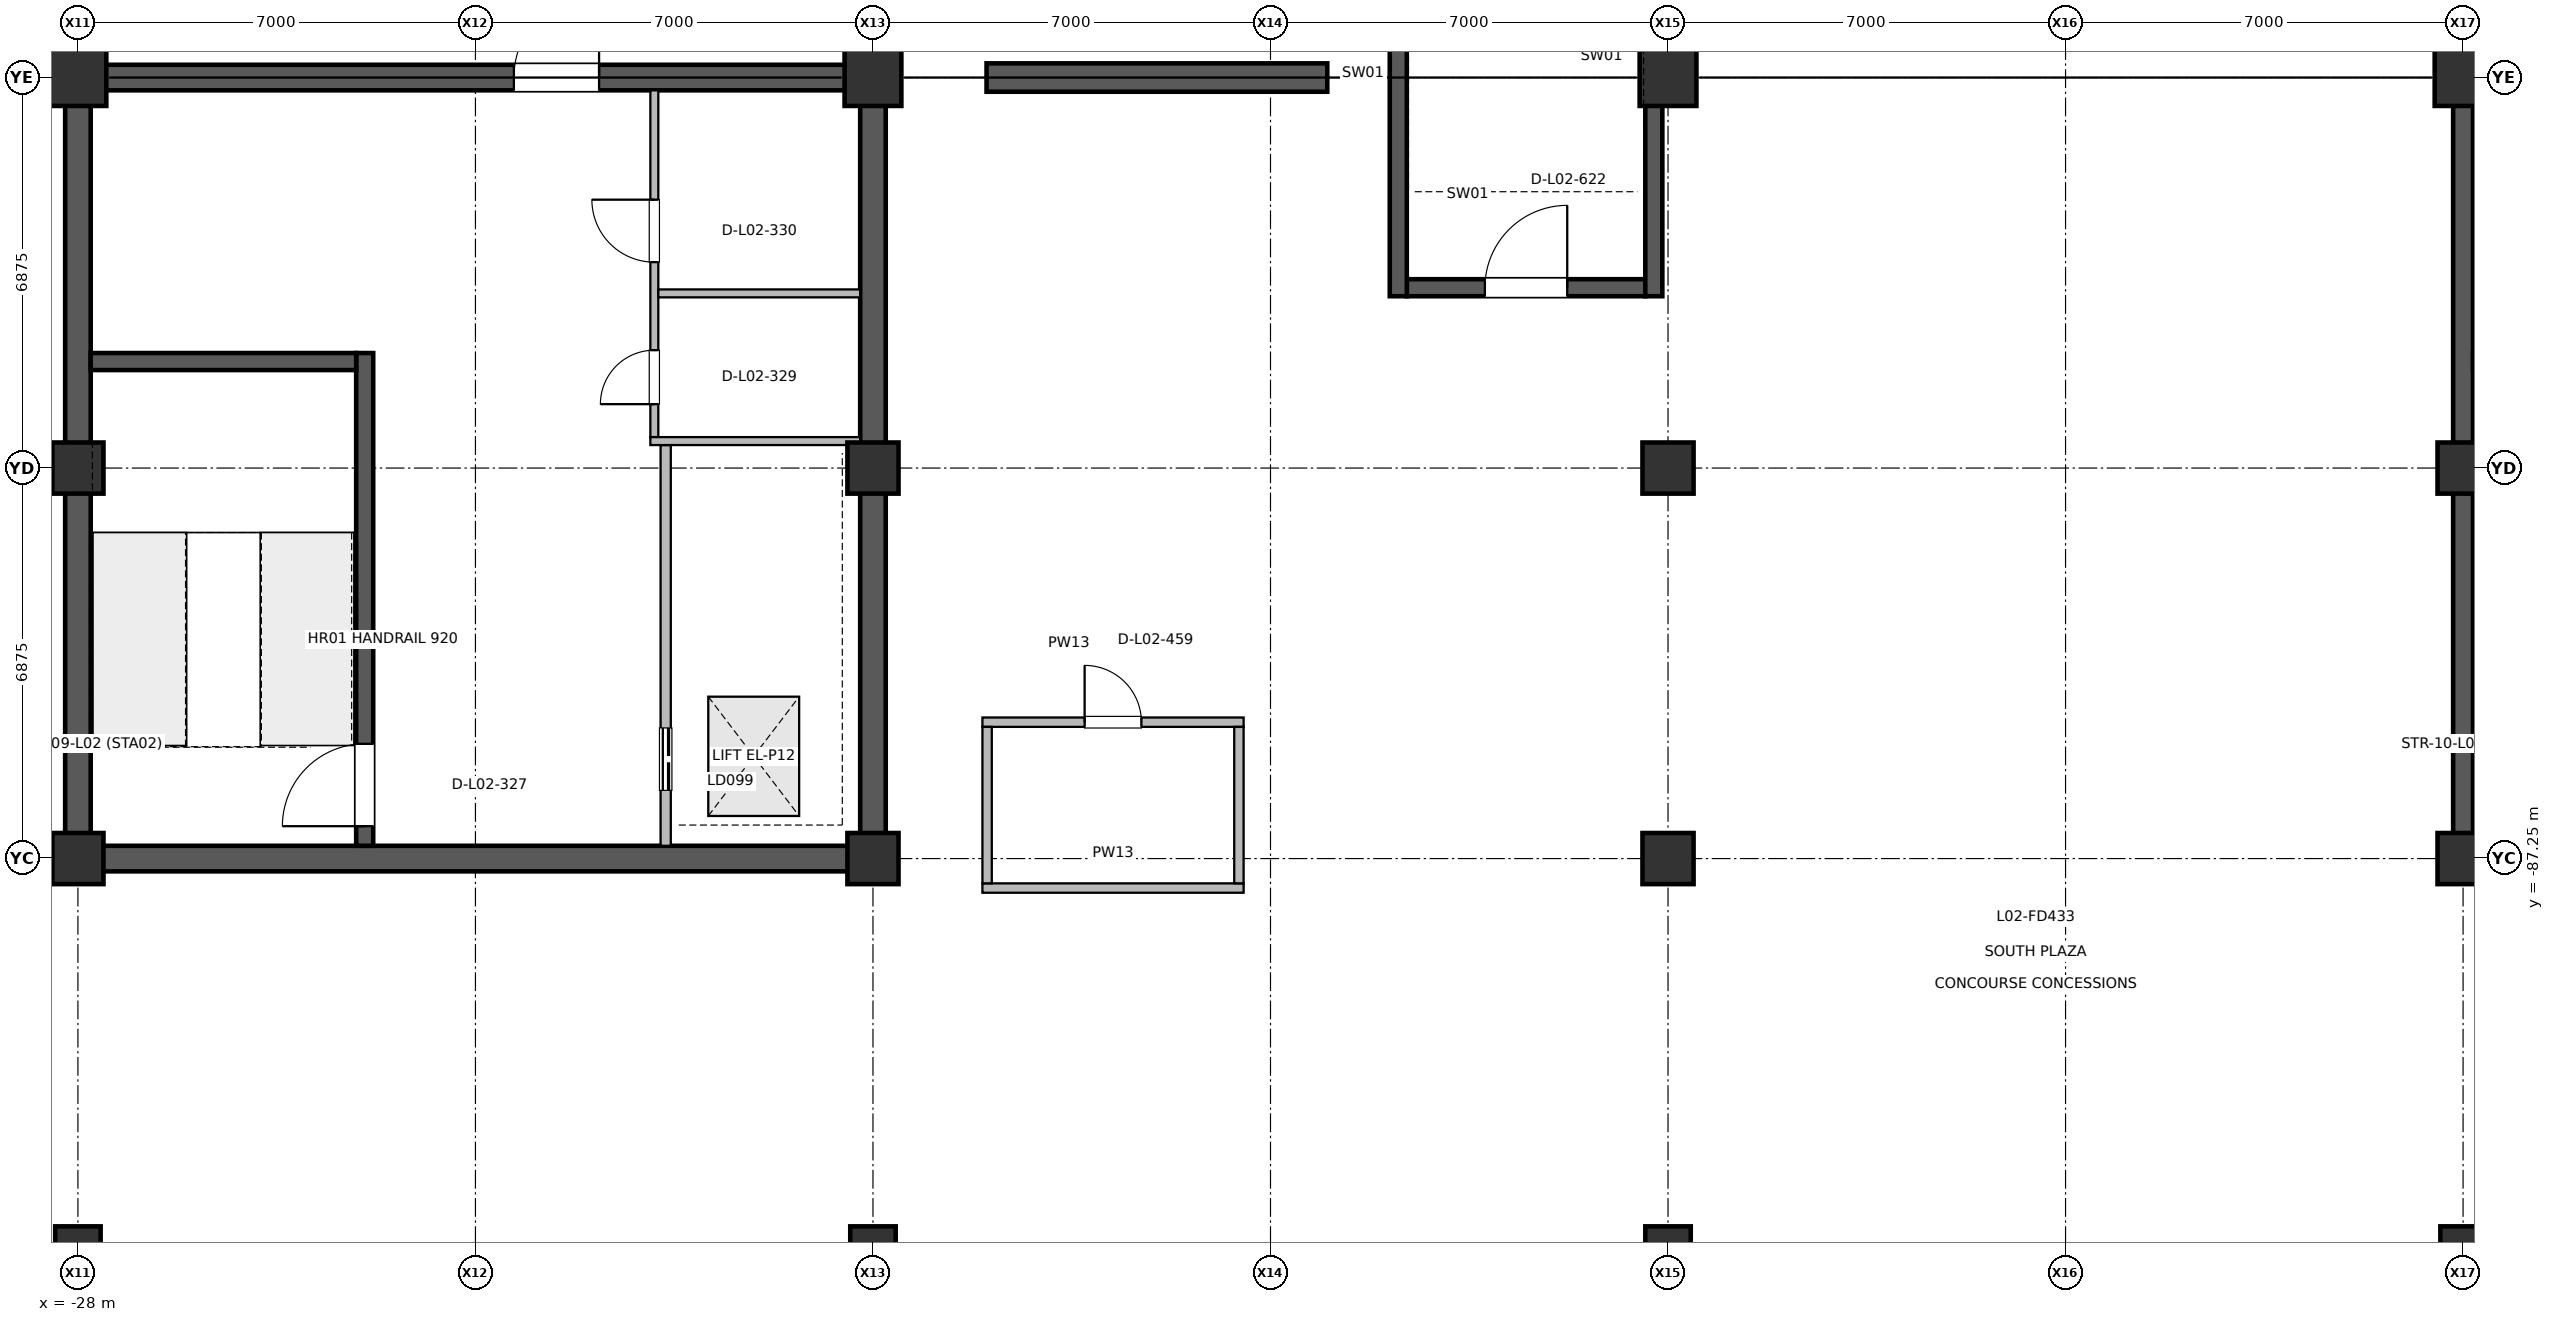
"""IFC4 building model, lengths in metres.
Left out: names, types, materials, properties, quantities, classifications, styles, units other than length and angle.
Written with IfcOpenShell. Run it as: python <this file> out.ifc"""

import sys

from ifc_helpers import new_model, si_unit, direction, frame, frame_2d, origin, origin_2d, place, context, subcontext, project, spatial, rectangle, circle, extrude, element, fill, save


model = new_model("IFC4")
c1 = context("Model", 3, precision=1e-05, world=origin(), true_north=direction((0.0, 1.0)))
c2 = subcontext(c1, "Body", "Model", "MODEL_VIEW")
j1 = project(units=[si_unit("LENGTHUNIT", "METRE"), si_unit("PLANEANGLEUNIT", "RADIAN")], contexts=[c1])
p1 = place(None, origin())
s1 = spatial("IfcSite", under=j1, at=p1, CompositionType="ELEMENT")
p2 = place(p1, origin())
s2 = spatial("IfcBuilding", under=s1, at=p2, CompositionType="ELEMENT")
p3 = place(p2, frame((0.0, 0.0, 6.0)))
s3 = spatial("IfcBuildingStorey", under=s2, at=p3, CompositionType="ELEMENT", Elevation=6.0)
p4 = place(p3, frame((-28.0, -94.125, 0.0), z_axis=(0.0, 0.0, 1.0), x_axis=(1.0, 0.0, 0.0)))
e1 = element("IfcColumn", 1, at=p4, inside=s3, PredefinedType="COLUMN", context=c2, shape_type="SweptSolid", body=[
    extrude(circle(Radius=0.4, at=origin_2d()), origin(), (0.0, 0.0, 1.0), 5.16),
])
for number, where, z_axis, x_axis in (
    (2, (-28.0, -87.25, 0.0), (0.0, 0.0, 1.0), (1.0, 0.0, 0.0)),
    (3, (-28.0, -80.375, 0.0), (0.0, 0.0, 1.0), (1.0, 0.0, 0.0)),
):
    element("IfcColumn", number, at=place(p3, frame(where, z_axis=z_axis, x_axis=x_axis)), inside=s3, PredefinedType="COLUMN", context=c2, shape_type="SweptSolid", body=[
        extrude(rectangle(XDim=0.9, YDim=0.9, at=origin_2d()), origin(), (0.0, 0.0, 1.0), 5.398),
    ])
p5 = place(p3, frame((-28.0, -73.5, 0.0), z_axis=(0.0, 0.0, 1.0), x_axis=(1.0, 0.0, 0.0)))
e4 = element("IfcColumn", 4, at=p5, inside=s3, PredefinedType="COLUMN", context=c2, shape_type="SweptSolid", body=[
    extrude(rectangle(XDim=1.0, YDim=1.0, at=origin_2d()), origin(), (0.0, 0.0, 1.0), 5.398),
])
p6 = place(p3, frame((-14.0, -94.125, 0.0), z_axis=(0.0, 0.0, 1.0), x_axis=(1.0, 0.0, 0.0)))
e5 = element("IfcColumn", 5, at=p6, inside=s3, PredefinedType="COLUMN", context=c2, shape_type="SweptSolid", body=[
    extrude(circle(Radius=0.4, at=origin_2d()), origin(), (0.0, 0.0, 1.0), 5.16),
])
for number, where, z_axis, x_axis in (
    (6, (-14.0, -87.25, 0.0), (0.0, 0.0, 1.0), (1.0, 0.0, 0.0)),
    (7, (-14.0, -80.375, 0.0), (0.0, 0.0, 1.0), (1.0, 0.0, 0.0)),
):
    element("IfcColumn", number, at=place(p3, frame(where, z_axis=z_axis, x_axis=x_axis)), inside=s3, PredefinedType="COLUMN", context=c2, shape_type="SweptSolid", body=[
        extrude(rectangle(XDim=0.9, YDim=0.9, at=origin_2d()), origin(), (0.0, 0.0, 1.0), 5.398),
    ])
p7 = place(p3, frame((-14.0, -73.5, 0.0), z_axis=(0.0, 0.0, 1.0), x_axis=(1.0, 0.0, 0.0)))
e8 = element("IfcColumn", 8, at=p7, inside=s3, PredefinedType="COLUMN", context=c2, shape_type="SweptSolid", body=[
    extrude(rectangle(XDim=1.0, YDim=1.0, at=origin_2d()), origin(), (0.0, 0.0, 1.0), 5.398),
])
p8 = place(p3, frame((0.0, -94.125, 0.0), z_axis=(0.0, 0.0, 1.0), x_axis=(1.0, 0.0, 0.0)))
e9 = element("IfcColumn", 9, at=p8, inside=s3, PredefinedType="COLUMN", context=c2, shape_type="SweptSolid", body=[
    extrude(circle(Radius=0.4, at=origin_2d()), origin(), (0.0, 0.0, 1.0), 5.16),
])
for number, where, z_axis, x_axis in (
    (10, (0.0, -87.25, 0.0), (0.0, 0.0, 1.0), (1.0, 0.0, 0.0)),
    (11, (0.0, -80.375, 0.0), (0.0, 0.0, 1.0), (1.0, 0.0, 0.0)),
):
    element("IfcColumn", number, at=place(p3, frame(where, z_axis=z_axis, x_axis=x_axis)), inside=s3, PredefinedType="COLUMN", context=c2, shape_type="SweptSolid", body=[
        extrude(rectangle(XDim=0.9, YDim=0.9, at=origin_2d()), origin(), (0.0, 0.0, 1.0), 5.398),
    ])
p9 = place(p3, frame((0.0, -73.5, 0.0), z_axis=(0.0, 0.0, 1.0), x_axis=(1.0, 0.0, 0.0)))
e12 = element("IfcColumn", 12, at=p9, inside=s3, PredefinedType="COLUMN", context=c2, shape_type="SweptSolid", body=[
    extrude(rectangle(XDim=1.0, YDim=1.0, at=origin_2d()), origin(), (0.0, 0.0, 1.0), 5.398),
])
p10 = place(p3, frame((14.0, -94.125, 0.0), z_axis=(0.0, 0.0, 1.0), x_axis=(1.0, 0.0, 0.0)))
e13 = element("IfcColumn", 13, at=p10, inside=s3, PredefinedType="COLUMN", context=c2, shape_type="SweptSolid", body=[
    extrude(circle(Radius=0.4, at=origin_2d()), origin(), (0.0, 0.0, 1.0), 5.16),
])
for number, where, z_axis, x_axis in (
    (14, (14.0, -87.25, 0.0), (0.0, 0.0, 1.0), (1.0, 0.0, 0.0)),
    (15, (14.0, -80.375, 0.0), (0.0, 0.0, 1.0), (1.0, 0.0, 0.0)),
):
    element("IfcColumn", number, at=place(p3, frame(where, z_axis=z_axis, x_axis=x_axis)), inside=s3, PredefinedType="COLUMN", context=c2, shape_type="SweptSolid", body=[
        extrude(rectangle(XDim=0.9, YDim=0.9, at=origin_2d()), origin(), (0.0, 0.0, 1.0), 5.398),
    ])
p11 = place(p3, frame((14.0, -73.5, 0.0), z_axis=(0.0, 0.0, 1.0), x_axis=(1.0, 0.0, 0.0)))
e16 = element("IfcColumn", 16, at=p11, inside=s3, PredefinedType="COLUMN", context=c2, shape_type="SweptSolid", body=[
    extrude(rectangle(XDim=1.0, YDim=1.0, at=origin_2d()), origin(), (0.0, 0.0, 1.0), 5.398),
])
for number, where, z_axis, x_axis in (
    (17, (-28.0, -87.025, 0.0), (0.0, 0.0, 1.0), (0.0, 1.0, 0.0)),
    (18, (-14.0, -87.025, 0.0), (0.0, 0.0, 1.0), (0.0, 1.0, 0.0)),
):
    element("IfcWall", number, at=place(p3, frame(where, z_axis=z_axis, x_axis=x_axis)), inside=s3, PredefinedType="SHEAR", context=c2, shape_type="SweptSolid", body=[
        extrude(rectangle(XDim=13.3, YDim=0.45, at=frame_2d((6.65, 0.0))), origin(), (0.0, 0.0, 1.0), 5.2),
    ])
p12 = place(p3, frame((-27.775, -87.25, 0.0), z_axis=(0.0, 0.0, 1.0), x_axis=(1.0, 0.0, 0.0)))
e19 = element("IfcWall", 19, at=p12, inside=s3, PredefinedType="SHEAR", context=c2, shape_type="SweptSolid", body=[
    extrude(rectangle(XDim=13.55, YDim=0.45, at=frame_2d((6.775, 0.0))), origin(), (0.0, 0.0, 1.0), 5.2),
])
p13 = place(p3, frame((-27.775, -73.5, 0.0), z_axis=(0.0, 0.0, 1.0), x_axis=(1.0, 0.0, 0.0)))
e20 = element("IfcWall", 20, at=p13, inside=s3, PredefinedType="SHEAR", context=c2, shape_type="SweptSolid", body=[
    extrude(rectangle(XDim=13.55, YDim=0.45, at=frame_2d((6.775, 0.0))), origin(), (0.0, 0.0, 1.0), 5.2),
])
p14 = place(p13, frame((7.452, 0.0, 0.0)))
e21 = element("IfcOpeningElement", 21, at=p14, cuts=e20, PredefinedType="OPENING", context=c2, shape_type="SweptSolid", body=[
    extrude(rectangle(XDim=1.5, YDim=2.2, at=frame_2d((0.75, 1.1))), frame((0.0, 0.235, 0.0), z_axis=(0.0, -1.0, 0.0), x_axis=(1.0, 0.0, 0.0)), (0.0, 0.0, 1.0), 0.47),
])
p15 = place(p3, frame((14.0, -87.075, 0.0), z_axis=(0.0, 0.0, 1.0), x_axis=(0.0, 1.0, 0.0)))
e22 = element("IfcWall", 22, at=p15, inside=s3, PredefinedType="SHEAR", context=c2, shape_type="SweptSolid", body=[
    extrude(rectangle(XDim=13.4, YDim=0.35, at=frame_2d((6.7, 0.0))), origin(), (0.0, 0.0, 1.0), 5.2),
])
p16 = place(p3, frame((14.175, -87.25, 0.0), z_axis=(0.0, 0.0, 1.0), x_axis=(1.0, 0.0, 0.0)))
e23 = element("IfcWall", 23, at=p16, inside=s3, PredefinedType="SHEAR", context=c2, shape_type="SweptSolid", body=[
    extrude(rectangle(XDim=13.65, YDim=0.35, at=frame_2d((6.825, 0.0))), origin(), (0.0, 0.0, 1.0), 5.2),
])
p17 = place(p3, frame((14.175, -73.5, 0.0), z_axis=(0.0, 0.0, 1.0), x_axis=(1.0, 0.0, 0.0)))
e24 = element("IfcWall", 24, at=p17, inside=s3, PredefinedType="SHEAR", context=c2, shape_type="SweptSolid", body=[
    extrude(rectangle(XDim=13.65, YDim=0.35, at=frame_2d((6.825, 0.0))), origin(), (0.0, 0.0, 1.0), 5.2),
])
p18 = place(p17, frame((7.507, 0.0, 0.0)))
e25 = element("IfcOpeningElement", 25, at=p18, cuts=e24, PredefinedType="OPENING", context=c2, shape_type="SweptSolid", body=[
    extrude(rectangle(XDim=1.5, YDim=2.2, at=frame_2d((0.75, 1.1))), frame((0.0, 0.185, 0.0), z_axis=(0.0, -1.0, 0.0), x_axis=(1.0, 0.0, 0.0)), (0.0, 0.0, 1.0), 0.37),
])
p19 = place(p3, frame((-12.0, -73.5, 0.0), z_axis=(0.0, 0.0, 1.0), x_axis=(1.0, 0.0, 0.0)))
e26 = element("IfcWall", 26, at=p19, inside=s3, PredefinedType="SHEAR", context=c2, shape_type="SweptSolid", body=[
    extrude(rectangle(XDim=6.0, YDim=0.5, at=frame_2d((3.0, 0.0))), origin(), (0.0, 0.0, 1.0), 5.2),
])
p20 = place(p3, frame((-22.95, -87.025, 0.0), z_axis=(0.0, 0.0, 1.0), x_axis=(0.0, 1.0, 0.0)))
e27 = element("IfcWall", 27, at=p20, inside=s3, PredefinedType="SHEAR", context=c2, shape_type="SweptSolid", body=[
    extrude(rectangle(XDim=8.675, YDim=0.3, at=frame_2d((4.337, 0.0))), origin(), (0.0, 0.0, 1.0), 5.2),
])
p21 = place(p20, frame((0.345, 0.0, 0.0)))
e28 = element("IfcOpeningElement", 28, at=p21, cuts=e27, PredefinedType="OPENING", context=c2, shape_type="SweptSolid", body=[
    extrude(rectangle(XDim=1.45, YDim=2.2, at=frame_2d((0.725, 1.1))), frame((0.0, 0.16, 0.0), z_axis=(0.0, -1.0, 0.0), x_axis=(1.0, 0.0, 0.0)), (0.0, 0.0, 1.0), 0.32),
])
p22 = place(p3, frame((-17.65, -87.025, 0.0), z_axis=(0.0, 0.0, 1.0), x_axis=(0.0, 1.0, 0.0)))
e29 = element("IfcWall", 29, at=p22, inside=s3, PredefinedType="PARTITIONING", context=c2, shape_type="SweptSolid", body=[
    extrude(rectangle(XDim=7.055, YDim=0.18, at=frame_2d((3.527, 0.0))), origin(), (0.0, 0.0, 1.0), 4.42),
])
p23 = place(p22, frame((0.975, 0.0, 0.0)))
e30 = element("IfcOpeningElement", 30, at=p23, cuts=e29, PredefinedType="OPENING", context=c2, shape_type="SweptSolid", body=[
    extrude(rectangle(XDim=1.1, YDim=2.2, at=frame_2d((0.55, 1.1))), frame((0.0, 0.1, 0.0), z_axis=(0.0, -1.0, 0.0), x_axis=(1.0, 0.0, 0.0)), (0.0, 0.0, 1.0), 0.2),
])
p24 = place(p3, frame((-17.85, -79.83, 0.0), z_axis=(0.0, 0.0, 1.0), x_axis=(0.0, 1.0, 0.0)))
e31 = element("IfcWall", 31, at=p24, inside=s3, PredefinedType="PARTITIONING", context=c2, shape_type="SweptSolid", body=[
    extrude(rectangle(XDim=6.105, YDim=0.14, at=frame_2d((3.052, 0.0))), origin(), (0.0, 0.0, 1.0), 4.42),
])
p25 = place(p24, frame((0.58, 0.0, 0.0)))
e32 = element("IfcOpeningElement", 32, at=p25, cuts=e31, PredefinedType="OPENING", context=c2, shape_type="SweptSolid", body=[
    extrude(rectangle(XDim=0.95, YDim=2.15, at=frame_2d((0.475, 1.075))), frame((0.0, 0.08, 0.0), z_axis=(0.0, -1.0, 0.0), x_axis=(1.0, 0.0, 0.0)), (0.0, 0.0, 1.0), 0.16),
])
p26 = place(p24, frame((3.08, 0.0, 0.0)))
e33 = element("IfcOpeningElement", 33, at=p26, cuts=e31, PredefinedType="OPENING", context=c2, shape_type="SweptSolid", body=[
    extrude(rectangle(XDim=1.1, YDim=2.15, at=frame_2d((0.55, 1.075))), frame((0.0, 0.08, 0.0), z_axis=(0.0, -1.0, 0.0), x_axis=(1.0, 0.0, 0.0)), (0.0, 0.0, 1.0), 0.16),
])
p27 = place(p3, frame((-12.073, -84.849, 0.0), z_axis=(0.0, 0.0, 1.0), x_axis=(1.0, 0.0, 0.0)))
e34 = element("IfcWall", 34, at=p27, inside=s3, PredefinedType="PARTITIONING", context=c2, shape_type="SweptSolid", body=[
    extrude(rectangle(XDim=4.6, YDim=0.165, at=frame_2d((2.3, 0.0))), origin(), (0.0, 0.0, 1.0), 4.42),
])
p28 = place(p27, frame((1.8, 0.0, 0.0)))
e35 = element("IfcOpeningElement", 35, at=p28, cuts=e34, PredefinedType="OPENING", context=c2, shape_type="SweptSolid", body=[
    extrude(rectangle(XDim=1.0, YDim=2.15, at=frame_2d((0.5, 1.075))), frame((0.0, 0.093, 0.0), z_axis=(0.0, -1.0, 0.0), x_axis=(1.0, 0.0, 0.0)), (0.0, 0.0, 1.0), 0.185),
])
p29 = place(p3, frame((-17.92, -79.9, 0.0), z_axis=(0.0, 0.0, 1.0), x_axis=(1.0, 0.0, 0.0)))
e36 = element("IfcWall", 36, at=p29, inside=s3, PredefinedType="PARTITIONING", context=c2, shape_type="SweptSolid", body=[
    extrude(rectangle(XDim=3.695, YDim=0.14, at=frame_2d((1.847, 0.0))), origin(), (0.0, 0.0, 1.0), 4.42),
])
p30 = place(p3, frame((-17.78, -77.3, 0.0), z_axis=(0.0, 0.0, 1.0), x_axis=(1.0, 0.0, 0.0)))
e37 = element("IfcWall", 37, at=p30, inside=s3, PredefinedType="PARTITIONING", context=c2, shape_type="SweptSolid", body=[
    extrude(rectangle(XDim=3.555, YDim=0.14, at=frame_2d((1.777, 0.0))), origin(), (0.0, 0.0, 1.0), 4.42),
])
p31 = place(p3, frame((-12.073, -87.769, 0.0), z_axis=(0.0, 0.0, 1.0), x_axis=(1.0, 0.0, 0.0)))
e38 = element("IfcWall", 38, at=p31, inside=s3, PredefinedType="PARTITIONING", context=c2, shape_type="SweptSolid", body=[
    extrude(rectangle(XDim=4.6, YDim=0.165, at=frame_2d((2.3, 0.0))), origin(), (0.0, 0.0, 1.0), 4.075),
])
for number, where, z_axis, x_axis in (
    (39, (-11.99, -87.686, 0.0), (0.0, 0.0, 1.0), (0.0, 1.0, 0.0)),
    (40, (-7.556, -87.686, 0.0), (0.0, 0.0, 1.0), (0.0, 1.0, 0.0)),
):
    element("IfcWall", number, at=place(p3, frame(where, z_axis=z_axis, x_axis=x_axis)), inside=s3, PredefinedType="PARTITIONING", context=c2, shape_type="SweptSolid", body=[
        extrude(rectangle(XDim=2.754, YDim=0.165, at=frame_2d((1.377, 0.0))), origin(), (0.0, 0.0, 1.0), 4.075),
    ])
p32 = place(p3, frame((-27.775, -78.5, 0.0), z_axis=(0.0, 0.0, 1.0), x_axis=(1.0, 0.0, 0.0)))
e41 = element("IfcWall", 41, at=p32, inside=s3, PredefinedType="SHEAR", context=c2, shape_type="SweptSolid", body=[
    extrude(rectangle(XDim=4.675, YDim=0.3, at=frame_2d((2.337, 0.0))), origin(), (0.0, 0.0, 1.0), 5.2),
])
p33 = place(p3, frame((14.175, -78.5, 0.0), z_axis=(0.0, 0.0, 1.0), x_axis=(1.0, 0.0, 0.0)))
e42 = element("IfcWall", 42, at=p33, inside=s3, PredefinedType="SHEAR", context=c2, shape_type="SweptSolid", body=[
    extrude(rectangle(XDim=4.725, YDim=0.3, at=frame_2d((2.362, 0.0))), origin(), (0.0, 0.0, 1.0), 5.2),
])
p34 = place(p3, frame((-4.6, -77.2, 0.0), z_axis=(0.0, 0.0, 1.0), x_axis=(1.0, 0.0, 0.0)))
e43 = element("IfcWall", 43, at=p34, inside=s3, PredefinedType="SHEAR", context=c2, shape_type="SweptSolid", body=[
    extrude(rectangle(XDim=4.2, YDim=0.3, at=frame_2d((2.1, 0.0))), origin(), (0.0, 0.0, 1.0), 5.2),
])
p35 = place(p34, frame((1.375, 0.0, 0.0)))
e44 = element("IfcOpeningElement", 44, at=p35, cuts=e43, PredefinedType="OPENING", context=c2, shape_type="SweptSolid", body=[
    extrude(rectangle(XDim=1.45, YDim=2.2, at=frame_2d((0.725, 1.1))), frame((0.0, 0.16, 0.0), z_axis=(0.0, -1.0, 0.0), x_axis=(1.0, 0.0, 0.0)), (0.0, 0.0, 1.0), 0.32),
])
for number, where, z_axis, x_axis in (
    (45, (-4.75, -77.35, 0.0), (0.0, 0.0, 1.0), (0.0, 1.0, 0.0)),
    (46, (-0.25, -77.35, 0.0), (0.0, 0.0, 1.0), (0.0, 1.0, 0.0)),
):
    element("IfcWall", number, at=place(p3, frame(where, z_axis=z_axis, x_axis=x_axis)), inside=s3, PredefinedType="SHEAR", context=c2, shape_type="SweptSolid", body=[
        extrude(rectangle(XDim=8.45, YDim=0.3, at=frame_2d((4.225, 0.0))), origin(), (0.0, 0.0, 1.0), 5.2),
    ])
p36 = place(p14, origin())
e47 = element("IfcDoor", 47, at=p36, inside=s3, OperationType="SINGLE_SWING_RIGHT", PredefinedType="DOOR", context=c2, shape_type="SweptSolid", body=[
    extrude(rectangle(XDim=1.5, YDim=2.2, at=frame_2d((0.75, 1.1))), frame((0.0, 0.025, 0.0), z_axis=(0.0, -1.0, 0.0), x_axis=(1.0, 0.0, 0.0)), (0.0, 0.0, 1.0), 0.05),
])
fill(e21, e47)
p37 = place(p21, origin())
e48 = element("IfcDoor", 48, at=p37, inside=s3, OperationType="SINGLE_SWING_LEFT", PredefinedType="DOOR", context=c2, shape_type="SweptSolid", body=[
    extrude(rectangle(XDim=1.45, YDim=2.2, at=frame_2d((0.725, 1.1))), frame((0.0, 0.025, 0.0), z_axis=(0.0, -1.0, 0.0), x_axis=(1.0, 0.0, 0.0)), (0.0, 0.0, 1.0), 0.05),
])
fill(e28, e48)
p38 = place(p23, origin())
e49 = element("IfcDoor", 49, at=p38, inside=s3, OperationType="DOUBLE_DOOR_SLIDING", PredefinedType="DOOR", context=c2, shape_type="SweptSolid", body=[
    extrude(rectangle(XDim=1.1, YDim=2.2, at=frame_2d((0.55, 1.1))), frame((0.0, 0.025, 0.0), z_axis=(0.0, -1.0, 0.0), x_axis=(1.0, 0.0, 0.0)), (0.0, 0.0, 1.0), 0.05),
])
fill(e30, e49)
p39 = place(p25, origin())
e50 = element("IfcDoor", 50, at=p39, inside=s3, OperationType="SINGLE_SWING_LEFT", PredefinedType="DOOR", context=c2, shape_type="SweptSolid", body=[
    extrude(rectangle(XDim=0.95, YDim=2.15, at=frame_2d((0.475, 1.075))), frame((0.0, 0.025, 0.0), z_axis=(0.0, -1.0, 0.0), x_axis=(1.0, 0.0, 0.0)), (0.0, 0.0, 1.0), 0.05),
])
fill(e32, e50)
p40 = place(p26, origin())
e51 = element("IfcDoor", 51, at=p40, inside=s3, OperationType="SINGLE_SWING_RIGHT", PredefinedType="DOOR", context=c2, shape_type="SweptSolid", body=[
    extrude(rectangle(XDim=1.1, YDim=2.15, at=frame_2d((0.55, 1.075))), frame((0.0, 0.025, 0.0), z_axis=(0.0, -1.0, 0.0), x_axis=(1.0, 0.0, 0.0)), (0.0, 0.0, 1.0), 0.05),
])
fill(e33, e51)
p41 = place(p28, origin())
e52 = element("IfcDoor", 52, at=p41, inside=s3, OperationType="SINGLE_SWING_LEFT", PredefinedType="DOOR", context=c2, shape_type="SweptSolid", body=[
    extrude(rectangle(XDim=1.0, YDim=2.15, at=frame_2d((0.5, 1.075))), frame((0.0, 0.025, 0.0), z_axis=(0.0, -1.0, 0.0), x_axis=(1.0, 0.0, 0.0)), (0.0, 0.0, 1.0), 0.05),
])
fill(e35, e52)
p42 = place(p35, origin())
e53 = element("IfcDoor", 53, at=p42, inside=s3, OperationType="SINGLE_SWING_RIGHT", PredefinedType="DOOR", context=c2, shape_type="SweptSolid", body=[
    extrude(rectangle(XDim=1.45, YDim=2.2, at=frame_2d((0.725, 1.1))), frame((0.0, 0.025, 0.0), z_axis=(0.0, -1.0, 0.0), x_axis=(1.0, 0.0, 0.0)), (0.0, 0.0, 1.0), 0.05),
])
fill(e44, e53)
save(model, sys.argv[1])
